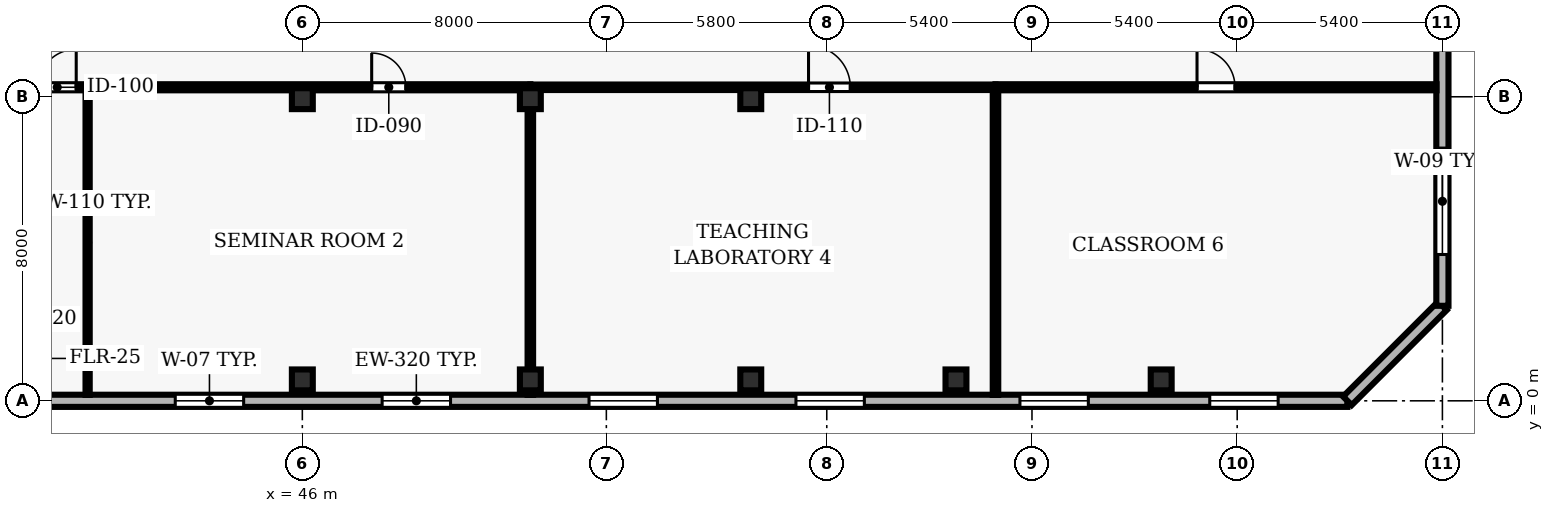
"""IFC4 building model, lengths in metres.
Left out: names, types, materials, properties, quantities, classifications, styles, units other than length and angle.
Written with IfcOpenShell. Run it as: python <this file> out.ifc"""

import sys

from ifc_helpers import new_model, si_unit, direction, frame, frame_2d, origin, origin_2d, place, context, subcontext, project, spatial, rectangle, hollow_rectangle, extrude, element, fill, save


model = new_model("IFC4")
c1 = context("Model", 3, precision=1e-05, world=origin(), true_north=direction((0.0, 1.0)))
c2 = subcontext(c1, "Body", "Model", "MODEL_VIEW")
j1 = project(units=[si_unit("LENGTHUNIT", "METRE"), si_unit("PLANEANGLEUNIT", "RADIAN")], contexts=[c1])
p1 = place(None, origin())
s1 = spatial("IfcSite", under=j1, at=p1, CompositionType="ELEMENT")
p2 = place(p1, origin())
s2 = spatial("IfcBuilding", under=s1, at=p2, CompositionType="ELEMENT")
p3 = place(p2, frame((0.0, 0.0, 31.0)))
s3 = spatial("IfcBuildingStorey", under=s2, at=p3, CompositionType="ELEMENT", Elevation=31.0)
for number, where, z_axis, x_axis in (
    (1, (46.0, 0.55, 0.0), (0.0, 0.0, 1.0), (1.0, 0.0, 0.0)),
    (2, (46.0, 7.95, 0.0), (0.0, 0.0, 1.0), (1.0, 0.0, 0.0)),
    (3, (52.0, 0.55, 0.0), (0.0, 0.0, 1.0), (1.0, 0.0, 0.0)),
    (4, (52.0, 7.95, 0.0), (0.0, 0.0, 1.0), (1.0, 0.0, 0.0)),
    (5, (57.8, 0.55, 0.0), (0.0, 0.0, 1.0), (1.0, 0.0, 0.0)),
    (6, (57.8, 7.95, 0.0), (0.0, 0.0, 1.0), (1.0, 0.0, 0.0)),
    (7, (63.2, 0.55, 0.0), (0.0, 0.0, 1.0), (1.0, 0.0, 0.0)),
    (8, (68.6, 0.55, 0.0), (0.0, 0.0, 1.0), (1.0, 0.0, 0.0)),
):
    element("IfcColumn", number, at=place(p3, frame(where, z_axis=z_axis, x_axis=x_axis)), inside=s3, PredefinedType="COLUMN", context=c2, shape_type="SweptSolid", body=[
        extrude(hollow_rectangle(XDim=0.55, YDim=0.55, WallThickness=0.025, at=origin_2d()), origin(), (0.0, 0.0, 1.0), 3.9),
    ])
p4 = place(p3, frame((24.5, 0.0, 0.0), z_axis=(0.0, 0.0, 1.0), x_axis=(1.0, 0.0, 0.0)))
e9 = element("IfcWall", 9, at=p4, inside=s3, PredefinedType="SOLIDWALL", context=c2, shape_type="SweptSolid", body=[
    extrude(rectangle(XDim=49.0, YDim=0.32, at=frame_2d((24.5, 0.0))), origin(), (0.0, 0.0, 1.0), 3.69),
])
p5 = place(p4, frame((1.822, 0.0, 0.9)))
e10 = element("IfcOpeningElement", 10, at=p5, cuts=e9, PredefinedType="OPENING", context=c2, shape_type="SweptSolid", body=[
    extrude(rectangle(XDim=1.8, YDim=1.8, at=frame_2d((0.9, 0.9))), frame((0.0, 0.17, 0.0), z_axis=(0.0, -1.0, 0.0), x_axis=(1.0, 0.0, 0.0)), (0.0, 0.0, 1.0), 0.34),
])
p6 = place(p4, frame((18.156, 0.0, 0.9)))
e11 = element("IfcOpeningElement", 11, at=p6, cuts=e9, PredefinedType="OPENING", context=c2, shape_type="SweptSolid", body=[
    extrude(rectangle(XDim=1.8, YDim=1.8, at=frame_2d((0.9, 0.9))), frame((0.0, 0.17, 0.0), z_axis=(0.0, -1.0, 0.0), x_axis=(1.0, 0.0, 0.0)), (0.0, 0.0, 1.0), 0.34),
])
p7 = place(p4, frame((23.6, 0.0, 0.9)))
e12 = element("IfcOpeningElement", 12, at=p7, cuts=e9, PredefinedType="OPENING", context=c2, shape_type="SweptSolid", body=[
    extrude(rectangle(XDim=1.8, YDim=1.8, at=frame_2d((0.9, 0.9))), frame((0.0, 0.17, 0.0), z_axis=(0.0, -1.0, 0.0), x_axis=(1.0, 0.0, 0.0)), (0.0, 0.0, 1.0), 0.34),
])
p8 = place(p4, frame((29.044, 0.0, 0.9)))
e13 = element("IfcOpeningElement", 13, at=p8, cuts=e9, PredefinedType="OPENING", context=c2, shape_type="SweptSolid", body=[
    extrude(rectangle(XDim=1.8, YDim=1.8, at=frame_2d((0.9, 0.9))), frame((0.0, 0.17, 0.0), z_axis=(0.0, -1.0, 0.0), x_axis=(1.0, 0.0, 0.0)), (0.0, 0.0, 1.0), 0.34),
])
p9 = place(p4, frame((34.489, 0.0, 0.9)))
e14 = element("IfcOpeningElement", 14, at=p9, cuts=e9, PredefinedType="OPENING", context=c2, shape_type="SweptSolid", body=[
    extrude(rectangle(XDim=1.8, YDim=1.8, at=frame_2d((0.9, 0.9))), frame((0.0, 0.17, 0.0), z_axis=(0.0, -1.0, 0.0), x_axis=(1.0, 0.0, 0.0)), (0.0, 0.0, 1.0), 0.34),
])
p10 = place(p4, frame((40.383, 0.0, 0.9)))
e15 = element("IfcOpeningElement", 15, at=p10, cuts=e9, PredefinedType="OPENING", context=c2, shape_type="SweptSolid", body=[
    extrude(rectangle(XDim=1.8, YDim=1.8, at=frame_2d((0.9, 0.9))), frame((0.0, 0.17, 0.0), z_axis=(0.0, -1.0, 0.0), x_axis=(1.0, 0.0, 0.0)), (0.0, 0.0, 1.0), 0.34),
])
p11 = place(p4, frame((45.378, 0.0, 0.9)))
e16 = element("IfcOpeningElement", 16, at=p11, cuts=e9, PredefinedType="OPENING", context=c2, shape_type="SweptSolid", body=[
    extrude(rectangle(XDim=1.8, YDim=1.8, at=frame_2d((0.9, 0.9))), frame((0.0, 0.17, 0.0), z_axis=(0.0, -1.0, 0.0), x_axis=(1.0, 0.0, 0.0)), (0.0, 0.0, 1.0), 0.34),
])
p12 = place(p3, frame((73.5, 0.0, 0.0), z_axis=(0.0, 0.0, 1.0), x_axis=(0.707106781187, 0.707106781187, 0.0)))
e17 = element("IfcWall", 17, at=p12, inside=s3, PredefinedType="SOLIDWALL", context=c2, shape_type="SweptSolid", body=[
    extrude(rectangle(XDim=3.536, YDim=0.32, at=frame_2d((1.768, 0.0))), origin(), (0.0, 0.0, 1.0), 3.69),
])
p13 = place(p3, frame((76.0, 2.5, 0.0), z_axis=(0.0, 0.0, 1.0), x_axis=(0.0, 1.0, 0.0)))
e18 = element("IfcWall", 18, at=p13, inside=s3, PredefinedType="SOLIDWALL", context=c2, shape_type="SweptSolid", body=[
    extrude(rectangle(XDim=11.0, YDim=0.32, at=frame_2d((5.5, 0.0))), origin(), (0.0, 0.0, 1.0), 3.69),
])
p14 = place(p13, frame((1.35, 0.0, 0.9)))
e19 = element("IfcOpeningElement", 19, at=p14, cuts=e18, PredefinedType="OPENING", context=c2, shape_type="SweptSolid", body=[
    extrude(rectangle(XDim=2.8, YDim=1.8, at=frame_2d((1.4, 0.9))), frame((0.0, 0.17, 0.0), z_axis=(0.0, -1.0, 0.0), x_axis=(1.0, 0.0, 0.0)), (0.0, 0.0, 1.0), 0.34),
])
p15 = place(p3, frame((38.05, 8.25, 0.0), z_axis=(0.0, 0.0, 1.0), x_axis=(1.0, 0.0, 0.0)))
e20 = element("IfcWall", 20, at=p15, inside=s3, PredefinedType="PARTITIONING", context=c2, shape_type="SweptSolid", body=[
    extrude(rectangle(XDim=2.3, YDim=0.16, at=frame_2d((1.15, 0.0))), origin(), (0.0, 0.0, 1.0), 2.995),
])
p16 = place(p15, frame((1.0, 0.0, 0.0)))
e21 = element("IfcOpeningElement", 21, at=p16, cuts=e20, PredefinedType="OPENING", context=c2, shape_type="SweptSolid", body=[
    extrude(rectangle(XDim=1.0, YDim=2.1, at=frame_2d((0.5, 1.05))), frame((0.0, 0.09, 0.0), z_axis=(0.0, -1.0, 0.0), x_axis=(1.0, 0.0, 0.0)), (0.0, 0.0, 1.0), 0.18),
])
p17 = place(p3, frame((40.35, 8.25, 0.0), z_axis=(0.0, 0.0, 1.0), x_axis=(1.0, 0.0, 0.0)))
e22 = element("IfcWall", 22, at=p17, inside=s3, PredefinedType="PARTITIONING", context=c2, shape_type="SweptSolid", body=[
    extrude(rectangle(XDim=11.65, YDim=0.16, at=frame_2d((5.825, 0.0))), origin(), (0.0, 0.0, 1.0), 2.995),
])
p18 = place(p17, frame((7.475, 0.0, 0.0)))
e23 = element("IfcOpeningElement", 23, at=p18, cuts=e22, PredefinedType="OPENING", context=c2, shape_type="SweptSolid", body=[
    extrude(rectangle(XDim=0.9, YDim=2.1, at=frame_2d((0.45, 1.05))), frame((0.0, 0.09, 0.0), z_axis=(0.0, -1.0, 0.0), x_axis=(1.0, 0.0, 0.0)), (0.0, 0.0, 1.0), 0.18),
])
p19 = place(p3, frame((52.0, 8.25, 0.0), z_axis=(0.0, 0.0, 1.0), x_axis=(1.0, 0.0, 0.0)))
e24 = element("IfcWall", 24, at=p19, inside=s3, PredefinedType="PARTITIONING", context=c2, shape_type="SweptSolid", body=[
    extrude(rectangle(XDim=12.24, YDim=0.145, at=frame_2d((6.12, 0.0))), origin(), (0.0, 0.0, 1.0), 2.995),
])
p20 = place(p19, frame((7.32, 0.0, 0.0)))
e25 = element("IfcOpeningElement", 25, at=p20, cuts=e24, PredefinedType="OPENING", context=c2, shape_type="SweptSolid", body=[
    extrude(rectangle(XDim=1.1, YDim=2.15, at=frame_2d((0.55, 1.075))), frame((0.0, 0.083, 0.0), z_axis=(0.0, -1.0, 0.0), x_axis=(1.0, 0.0, 0.0)), (0.0, 0.0, 1.0), 0.165),
])
p21 = place(p3, frame((64.24, 8.25, 0.0), z_axis=(0.0, 0.0, 1.0), x_axis=(1.0, 0.0, 0.0)))
e26 = element("IfcWall", 26, at=p21, inside=s3, PredefinedType="PARTITIONING", context=c2, shape_type="SweptSolid", body=[
    extrude(rectangle(XDim=11.605, YDim=0.16, at=frame_2d((5.802, 0.0))), origin(), (0.0, 0.0, 1.0), 3.69),
])
p22 = place(p21, frame((5.303, 0.0, 0.0)))
e27 = element("IfcOpeningElement", 27, at=p22, cuts=e26, PredefinedType="OPENING", context=c2, shape_type="SweptSolid", body=[
    extrude(rectangle(XDim=1.0, YDim=2.1, at=frame_2d((0.5, 1.05))), frame((0.0, 0.09, 0.0), z_axis=(0.0, -1.0, 0.0), x_axis=(1.0, 0.0, 0.0)), (0.0, 0.0, 1.0), 0.18),
])
p23 = place(p3, frame((40.35, 0.155, 0.0), z_axis=(0.0, 0.0, 1.0), x_axis=(0.0, 1.0, 0.0)))
e28 = element("IfcWall", 28, at=p23, inside=s3, PredefinedType="MOVABLE", context=c2, shape_type="SweptSolid", body=[
    extrude(rectangle(XDim=8.02, YDim=0.11, at=frame_2d((4.01, 0.0))), origin(), (0.0, 0.0, 1.0), 3.69),
])
p24 = place(p3, frame((52.0, 0.155, 0.0), z_axis=(0.0, 0.0, 1.0), x_axis=(0.0, 1.0, 0.0)))
e29 = element("IfcWall", 29, at=p24, inside=s3, PredefinedType="PARTITIONING", context=c2, shape_type="SweptSolid", body=[
    extrude(rectangle(XDim=8.02, YDim=0.145, at=frame_2d((4.01, 0.0))), origin(), (0.0, 0.0, 1.0), 2.995),
])
p25 = place(p3, frame((64.24, 0.155, 0.0), z_axis=(0.0, 0.0, 1.0), x_axis=(0.0, 1.0, 0.0)))
e30 = element("IfcWall", 30, at=p25, inside=s3, PredefinedType="PARTITIONING", context=c2, shape_type="SweptSolid", body=[
    extrude(rectangle(XDim=8.02, YDim=0.145, at=frame_2d((4.01, 0.0))), origin(), (0.0, 0.0, 1.0), 3.69),
])
p26 = place(p6, origin())
e31 = element("IfcWindow", 31, at=p26, inside=s3, PartitioningType="SINGLE_PANEL", PredefinedType="WINDOW", context=c2, shape_type="SweptSolid", body=[
    extrude(rectangle(XDim=1.8, YDim=1.8, at=frame_2d((0.9, 0.9))), frame((0.0, 0.03, 0.0), z_axis=(0.0, -1.0, 0.0), x_axis=(1.0, 0.0, 0.0)), (0.0, 0.0, 1.0), 0.06),
])
fill(e11, e31)
p27 = place(p7, origin())
e32 = element("IfcWindow", 32, at=p27, inside=s3, PartitioningType="SINGLE_PANEL", PredefinedType="WINDOW", context=c2, shape_type="SweptSolid", body=[
    extrude(rectangle(XDim=1.8, YDim=1.8, at=frame_2d((0.9, 0.9))), frame((0.0, 0.03, 0.0), z_axis=(0.0, -1.0, 0.0), x_axis=(1.0, 0.0, 0.0)), (0.0, 0.0, 1.0), 0.06),
])
fill(e12, e32)
p28 = place(p8, origin())
e33 = element("IfcWindow", 33, at=p28, inside=s3, PartitioningType="SINGLE_PANEL", PredefinedType="WINDOW", context=c2, shape_type="SweptSolid", body=[
    extrude(rectangle(XDim=1.8, YDim=1.8, at=frame_2d((0.9, 0.9))), frame((0.0, 0.03, 0.0), z_axis=(0.0, -1.0, 0.0), x_axis=(1.0, 0.0, 0.0)), (0.0, 0.0, 1.0), 0.06),
])
fill(e13, e33)
p29 = place(p9, origin())
e34 = element("IfcWindow", 34, at=p29, inside=s3, PartitioningType="SINGLE_PANEL", PredefinedType="WINDOW", context=c2, shape_type="SweptSolid", body=[
    extrude(rectangle(XDim=1.8, YDim=1.8, at=frame_2d((0.9, 0.9))), frame((0.0, 0.03, 0.0), z_axis=(0.0, -1.0, 0.0), x_axis=(1.0, 0.0, 0.0)), (0.0, 0.0, 1.0), 0.06),
])
fill(e14, e34)
p30 = place(p10, origin())
e35 = element("IfcWindow", 35, at=p30, inside=s3, PartitioningType="SINGLE_PANEL", PredefinedType="WINDOW", context=c2, shape_type="SweptSolid", body=[
    extrude(rectangle(XDim=1.8, YDim=1.8, at=frame_2d((0.9, 0.9))), frame((0.0, 0.03, 0.0), z_axis=(0.0, -1.0, 0.0), x_axis=(1.0, 0.0, 0.0)), (0.0, 0.0, 1.0), 0.06),
])
fill(e15, e35)
p31 = place(p11, origin())
e36 = element("IfcWindow", 36, at=p31, inside=s3, PartitioningType="SINGLE_PANEL", PredefinedType="WINDOW", context=c2, shape_type="SweptSolid", body=[
    extrude(rectangle(XDim=1.8, YDim=1.8, at=frame_2d((0.9, 0.9))), frame((0.0, 0.03, 0.0), z_axis=(0.0, -1.0, 0.0), x_axis=(1.0, 0.0, 0.0)), (0.0, 0.0, 1.0), 0.06),
])
fill(e16, e36)
p32 = place(p14, origin())
e37 = element("IfcWindow", 37, at=p32, inside=s3, PartitioningType="SINGLE_PANEL", PredefinedType="WINDOW", context=c2, shape_type="SweptSolid", body=[
    extrude(rectangle(XDim=2.8, YDim=1.8, at=frame_2d((1.4, 0.9))), frame((0.0, 0.03, 0.0), z_axis=(0.0, -1.0, 0.0), x_axis=(1.0, 0.0, 0.0)), (0.0, 0.0, 1.0), 0.06),
])
fill(e19, e37)
p33 = place(p16, origin())
e38 = element("IfcDoor", 38, at=p33, inside=s3, OperationType="SINGLE_SWING_RIGHT", PredefinedType="DOOR", context=c2, shape_type="SweptSolid", body=[
    extrude(rectangle(XDim=1.0, YDim=2.1, at=frame_2d((0.5, 1.05))), frame((0.0, 0.025, 0.0), z_axis=(0.0, -1.0, 0.0), x_axis=(1.0, 0.0, 0.0)), (0.0, 0.0, 1.0), 0.05),
])
fill(e21, e38)
p34 = place(p18, origin())
e39 = element("IfcDoor", 39, at=p34, inside=s3, OperationType="SINGLE_SWING_LEFT", PredefinedType="DOOR", context=c2, shape_type="SweptSolid", body=[
    extrude(rectangle(XDim=0.9, YDim=2.1, at=frame_2d((0.45, 1.05))), frame((0.0, 0.025, 0.0), z_axis=(0.0, -1.0, 0.0), x_axis=(1.0, 0.0, 0.0)), (0.0, 0.0, 1.0), 0.05),
])
fill(e23, e39)
p35 = place(p20, origin())
e40 = element("IfcDoor", 40, at=p35, inside=s3, OperationType="SINGLE_SWING_LEFT", PredefinedType="DOOR", context=c2, shape_type="SweptSolid", body=[
    extrude(rectangle(XDim=1.1, YDim=2.15, at=frame_2d((0.55, 1.075))), frame((0.0, 0.025, 0.0), z_axis=(0.0, -1.0, 0.0), x_axis=(1.0, 0.0, 0.0)), (0.0, 0.0, 1.0), 0.05),
])
fill(e25, e40)
p36 = place(p22, origin())
e41 = element("IfcDoor", 41, at=p36, inside=s3, OperationType="SINGLE_SWING_LEFT", PredefinedType="DOOR", context=c2, shape_type="SweptSolid", body=[
    extrude(rectangle(XDim=1.0, YDim=2.1, at=frame_2d((0.5, 1.05))), frame((0.0, 0.025, 0.0), z_axis=(0.0, -1.0, 0.0), x_axis=(1.0, 0.0, 0.0)), (0.0, 0.0, 1.0), 0.05),
])
fill(e27, e41)
save(model, sys.argv[1])
